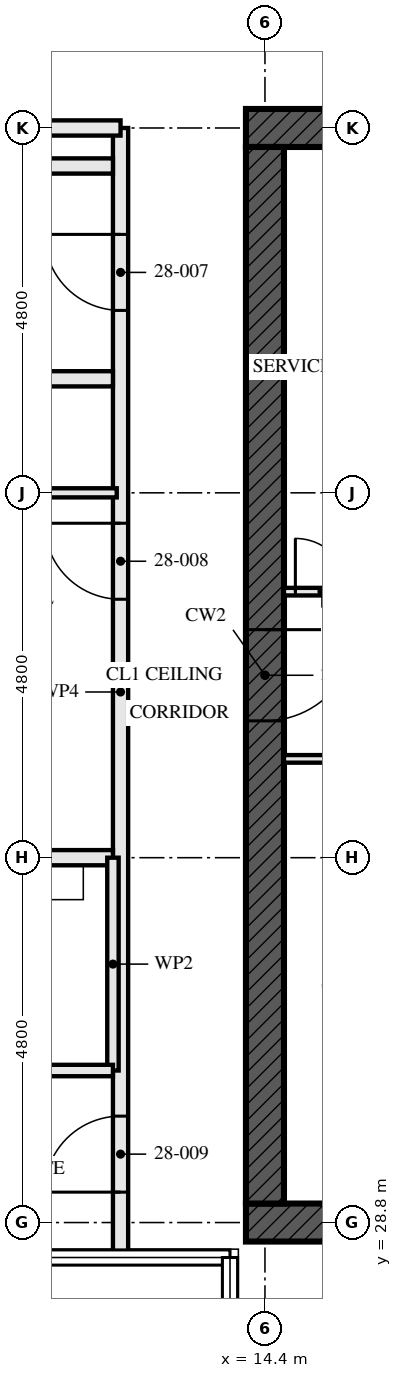
"""IFC4 building model, lengths in metres.
Left out: names, types, materials, properties, quantities, classifications, styles, units other than length and angle.
Written with IfcOpenShell. Run it as: python <this file> out.ifc"""

import sys

from ifc_helpers import new_model, si_unit, direction, frame, frame_2d, origin, place, context, subcontext, project, spatial, rectangle, extrude, element, fill, save


model = new_model("IFC4")
c1 = context("Model", 3, precision=1e-05, world=origin(), true_north=direction((0.0, 1.0)))
c2 = subcontext(c1, "Body", "Model", "MODEL_VIEW")
j1 = project(units=[si_unit("LENGTHUNIT", "METRE"), si_unit("PLANEANGLEUNIT", "RADIAN")], contexts=[c1])
p1 = place(None, origin())
s1 = spatial("IfcSite", under=j1, at=p1, CompositionType="ELEMENT")
p2 = place(p1, origin())
s2 = spatial("IfcBuilding", under=s1, at=p2, CompositionType="ELEMENT")
p3 = place(p2, frame((0.0, 0.0, 105.0)))
s3 = spatial("IfcBuildingStorey", under=s2, at=p3, CompositionType="ELEMENT", Elevation=105.0)
p4 = place(p3, frame((14.15, 28.8, -0.17), z_axis=(0.0, 0.0, 1.0), x_axis=(1.0, 0.0, 0.0)))
e1 = element("IfcWall", 1, at=p4, inside=s3, PredefinedType="SHEAR", context=c2, shape_type="SweptSolid", body=[
    extrude(rectangle(XDim=14.9, YDim=0.5, at=frame_2d((7.45, 0.0))), origin(), (0.0, 0.0, 1.0), 3.5),
])
p5 = place(p4, frame((6.85, 0.0, 0.17)))
e2 = element("IfcOpeningElement", 2, at=p5, cuts=e1, PredefinedType="OPENING", context=c2, shape_type="SweptSolid", body=[
    extrude(rectangle(XDim=1.2, YDim=2.1, at=frame_2d((0.6, 1.05))), frame((0.0, 0.26, 0.0), z_axis=(0.0, -1.0, 0.0), x_axis=(1.0, 0.0, 0.0)), (0.0, 0.0, 1.0), 0.521),
])
p6 = place(p3, frame((29.05, 43.2, -0.17), z_axis=(0.0, 0.0, 1.0), x_axis=(-1.0, 0.0, 0.0)))
e3 = element("IfcWall", 3, at=p6, inside=s3, PredefinedType="SHEAR", context=c2, shape_type="SweptSolid", body=[
    extrude(rectangle(XDim=14.9, YDim=0.5, at=frame_2d((7.45, 0.0))), origin(), (0.0, 0.0, 1.0), 3.5),
])
p7 = place(p6, frame((6.85, 0.0, 0.17)))
e4 = element("IfcOpeningElement", 4, at=p7, cuts=e3, PredefinedType="OPENING", context=c2, shape_type="SweptSolid", body=[
    extrude(rectangle(XDim=1.2, YDim=2.1, at=frame_2d((0.6, 1.05))), frame((0.0, 0.26, 0.0), z_axis=(0.0, -1.0, 0.0), x_axis=(1.0, 0.0, 0.0)), (0.0, 0.0, 1.0), 0.521),
])
p8 = place(p3, frame((14.4, 42.95, -0.17), z_axis=(0.0, 0.0, 1.0), x_axis=(0.0, -1.0, 0.0)))
e5 = element("IfcWall", 5, at=p8, inside=s3, PredefinedType="SHEAR", context=c2, shape_type="SweptSolid", body=[
    extrude(rectangle(XDim=13.9, YDim=0.5, at=frame_2d((6.95, 0.0))), origin(), (0.0, 0.0, 1.0), 3.5),
])
p9 = place(p8, frame((6.35, 0.0, 0.17)))
e6 = element("IfcOpeningElement", 6, at=p9, cuts=e5, PredefinedType="OPENING", context=c2, shape_type="SweptSolid", body=[
    extrude(rectangle(XDim=1.2, YDim=2.1, at=frame_2d((0.6, 1.05))), frame((0.0, 0.26, 0.0), z_axis=(0.0, -1.0, 0.0), x_axis=(1.0, 0.0, 0.0)), (0.0, 0.0, 1.0), 0.521),
])
for number, where, z_axis, x_axis in (
    (7, (7.7, 42.7, 0.0), (0.0, 0.0, 1.0), (1.0, 0.0, 0.0)),
    (8, (7.7, 39.9, 0.0), (0.0, 0.0, 1.0), (1.0, 0.0, 0.0)),
):
    element("IfcWall", number, at=place(p3, frame(where, z_axis=z_axis, x_axis=x_axis)), inside=s3, PredefinedType="SOLIDWALL", context=c2, shape_type="SweptSolid", body=[
        extrude(rectangle(XDim=4.7, YDim=0.2, at=frame_2d((2.35, 0.0))), origin(), (0.0, 0.0, 1.0), 2.99),
    ])
p10 = place(p3, frame((6.4, 38.4, 0.0), z_axis=(0.0, 0.0, 1.0), x_axis=(1.0, 0.0, 0.0)))
e9 = element("IfcWall", 9, at=p10, inside=s3, PredefinedType="PARTITIONING", context=c2, shape_type="SweptSolid", body=[
    extrude(rectangle(XDim=6.05, YDim=0.12, at=frame_2d((3.025, 0.0))), origin(), (0.0, 0.0, 1.0), 2.55),
])
p11 = place(p10, frame((4.05, 0.0, 0.0)))
e10 = element("IfcOpeningElement", 10, at=p11, cuts=e9, PredefinedType="OPENING", context=c2, shape_type="SweptSolid", body=[
    extrude(rectangle(XDim=0.9, YDim=2.1, at=frame_2d((0.45, 1.05))), frame((0.0, 0.071, 0.0), z_axis=(0.0, -1.0, 0.0), x_axis=(1.0, 0.0, 0.0)), (0.0, 0.0, 1.0), 0.141),
])
p12 = place(p3, frame((5.145, 33.6, 0.0), z_axis=(0.0, 0.0, 1.0), x_axis=(1.0, 0.0, 0.0)))
e11 = element("IfcWall", 11, at=p12, inside=s3, PredefinedType="PARTITIONING", context=c2, shape_type="SweptSolid", body=[
    extrude(rectangle(XDim=7.255, YDim=0.2, at=frame_2d((3.627, 0.0))), origin(), (0.0, 0.0, 1.0), 2.55),
])
p13 = place(p3, frame((9.4, 30.8, 0.0), z_axis=(0.0, 0.0, 1.0), x_axis=(1.0, 0.0, 0.0)))
e12 = element("IfcWall", 12, at=p13, inside=s3, PredefinedType="PARTITIONING", context=c2, shape_type="SweptSolid", body=[
    extrude(rectangle(XDim=3.0, YDim=0.15, at=frame_2d((1.5, 0.0))), origin(), (0.0, 0.0, 1.0), 3.33),
])
p14 = place(p3, frame((12.4, 33.6, 0.0), z_axis=(0.0, 0.0, 1.0), x_axis=(0.0, -1.0, 0.0)))
e13 = element("IfcWall", 13, at=p14, inside=s3, PredefinedType="PARTITIONING", context=c2, shape_type="SweptSolid", body=[
    extrude(rectangle(XDim=2.8, YDim=0.15, at=frame_2d((1.4, 0.0))), origin(), (0.0, 0.0, 1.0), 3.33),
])
p15 = place(p3, frame((12.5, 43.2, 0.0), z_axis=(0.0, 0.0, 1.0), x_axis=(0.0, -1.0, 0.0)))
e14 = element("IfcWall", 14, at=p15, inside=s3, PredefinedType="PARTITIONING", context=c2, shape_type="SweptSolid", body=[
    extrude(rectangle(XDim=14.84, YDim=0.2, at=frame_2d((7.42, 0.0))), origin(), (0.0, 0.0, 1.0), 2.32),
])
p16 = place(p15, frame((1.4, 0.0, 0.0)))
e15 = element("IfcOpeningElement", 15, at=p16, cuts=e14, PredefinedType="OPENING", context=c2, shape_type="SweptSolid", body=[
    extrude(rectangle(XDim=1.0, YDim=2.1, at=frame_2d((0.5, 1.05))), frame((0.0, 0.111, 0.0), z_axis=(0.0, -1.0, 0.0), x_axis=(1.0, 0.0, 0.0)), (0.0, 0.0, 1.0), 0.221),
])
p17 = place(p15, frame((5.2, 0.0, 0.0)))
e16 = element("IfcOpeningElement", 16, at=p17, cuts=e14, PredefinedType="OPENING", context=c2, shape_type="SweptSolid", body=[
    extrude(rectangle(XDim=1.0, YDim=2.1, at=frame_2d((0.5, 1.05))), frame((0.0, 0.111, 0.0), z_axis=(0.0, -1.0, 0.0), x_axis=(1.0, 0.0, 0.0)), (0.0, 0.0, 1.0), 0.221),
])
p18 = place(p15, frame((13.0, 0.0, 0.0)))
e17 = element("IfcOpeningElement", 17, at=p18, cuts=e14, PredefinedType="OPENING", context=c2, shape_type="SweptSolid", body=[
    extrude(rectangle(XDim=1.0, YDim=2.1, at=frame_2d((0.5, 1.05))), frame((0.0, 0.111, 0.0), z_axis=(0.0, -1.0, 0.0), x_axis=(1.0, 0.0, 0.0)), (0.0, 0.0, 1.0), 0.221),
])
p19 = place(p3, frame((14.65, 34.9, 0.0), z_axis=(0.0, 0.0, 1.0), x_axis=(1.0, 0.0, 0.0)))
e18 = element("IfcWall", 18, at=p19, inside=s3, PredefinedType="SOLIDWALL", context=c2, shape_type="SweptSolid", body=[
    extrude(rectangle(XDim=5.9, YDim=0.1, at=frame_2d((2.95, 0.0))), origin(), (0.0, 0.0, 1.0), 3.33),
])
p20 = place(p19, frame((1.6, 0.0, 0.0)))
e19 = element("IfcOpeningElement", 19, at=p20, cuts=e18, PredefinedType="OPENING", context=c2, shape_type="SweptSolid", body=[
    extrude(rectangle(XDim=0.7, YDim=2.1, at=frame_2d((0.35, 1.05))), frame((0.0, 0.061, 0.0), z_axis=(0.0, -1.0, 0.0), x_axis=(1.0, 0.0, 0.0)), (0.0, 0.0, 1.0), 0.121),
])
p21 = place(p3, frame((14.65, 37.1, 0.0), z_axis=(0.0, 0.0, 1.0), x_axis=(1.0, 0.0, 0.0)))
e20 = element("IfcWall", 20, at=p21, inside=s3, PredefinedType="SOLIDWALL", context=c2, shape_type="SweptSolid", body=[
    extrude(rectangle(XDim=5.9, YDim=0.1, at=frame_2d((2.95, 0.0))), origin(), (0.0, 0.0, 1.0), 3.33),
])
p22 = place(p21, frame((0.15, 0.0, 0.0)))
e21 = element("IfcOpeningElement", 21, at=p22, cuts=e20, PredefinedType="OPENING", context=c2, shape_type="SweptSolid", body=[
    extrude(rectangle(XDim=0.7, YDim=2.1, at=frame_2d((0.35, 1.05))), frame((0.0, 0.061, 0.0), z_axis=(0.0, -1.0, 0.0), x_axis=(1.0, 0.0, 0.0)), (0.0, 0.0, 1.0), 0.121),
])
p23 = place(p21, frame((1.5, 0.0, 0.0)))
e22 = element("IfcOpeningElement", 22, at=p23, cuts=e20, PredefinedType="OPENING", context=c2, shape_type="SweptSolid", body=[
    extrude(rectangle(XDim=0.9, YDim=2.1, at=frame_2d((0.45, 1.05))), frame((0.0, 0.061, 0.0), z_axis=(0.0, -1.0, 0.0), x_axis=(1.0, 0.0, 0.0)), (0.0, 0.0, 1.0), 0.121),
])
p24 = place(p3, frame((12.5, 43.2, 0.0), z_axis=(0.0, 0.0, 1.0), x_axis=(-1.0, 0.0, 0.0)))
e23 = element("IfcWall", 23, at=p24, inside=s3, PredefinedType="PARTITIONING", context=c2, shape_type="SweptSolid", body=[
    extrude(rectangle(XDim=2.555, YDim=0.2, at=frame_2d((1.277, 0.0))), origin(), (0.0, 0.0, 1.0), 2.32),
])
p25 = place(p16, frame((1.0, 0.0, 0.0), z_axis=(0.0, 0.0, 1.0), x_axis=(-1.0, 0.0, 0.0)))
e24 = element("IfcDoor", 24, at=p25, inside=s3, OperationType="SINGLE_SWING_LEFT", PredefinedType="DOOR", context=c2, shape_type="SweptSolid", body=[
    extrude(rectangle(XDim=1.0, YDim=2.1, at=frame_2d((0.5, 1.05))), frame((0.0, 0.032, 0.0), z_axis=(0.0, -1.0, 0.0), x_axis=(1.0, 0.0, 0.0)), (0.0, 0.0, 1.0), 0.064),
])
fill(e15, e24)
p26 = place(p17, frame((1.0, 0.0, 0.0), z_axis=(0.0, 0.0, 1.0), x_axis=(-1.0, 0.0, 0.0)))
e25 = element("IfcDoor", 25, at=p26, inside=s3, OperationType="SINGLE_SWING_LEFT", PredefinedType="DOOR", context=c2, shape_type="SweptSolid", body=[
    extrude(rectangle(XDim=1.0, YDim=2.1, at=frame_2d((0.5, 1.05))), frame((0.0, 0.027, 0.0), z_axis=(0.0, -1.0, 0.0), x_axis=(1.0, 0.0, 0.0)), (0.0, 0.0, 1.0), 0.054),
])
fill(e16, e25)
p27 = place(p18, frame((1.0, 0.0, 0.0), z_axis=(0.0, 0.0, 1.0), x_axis=(-1.0, 0.0, 0.0)))
e26 = element("IfcDoor", 26, at=p27, inside=s3, OperationType="SINGLE_SWING_RIGHT", PredefinedType="DOOR", context=c2, shape_type="SweptSolid", body=[
    extrude(rectangle(XDim=1.0, YDim=2.1, at=frame_2d((0.5, 1.05))), frame((0.0, 0.027, 0.0), z_axis=(0.0, -1.0, 0.0), x_axis=(1.0, 0.0, 0.0)), (0.0, 0.0, 1.0), 0.054),
])
fill(e17, e26)
p28 = place(p22, origin())
e27 = element("IfcDoor", 27, at=p28, inside=s3, OperationType="SINGLE_SWING_RIGHT", PredefinedType="DOOR", context=c2, shape_type="SweptSolid", body=[
    extrude(rectangle(XDim=0.7, YDim=2.1, at=frame_2d((0.35, 1.05))), frame((0.0, 0.027, 0.0), z_axis=(0.0, -1.0, 0.0), x_axis=(1.0, 0.0, 0.0)), (0.0, 0.0, 1.0), 0.054),
])
fill(e21, e27)
p29 = place(p9, origin())
e28 = element("IfcDoor", 28, at=p29, inside=s3, OperationType="SINGLE_SWING_LEFT", PredefinedType="DOOR", context=c2, shape_type="SweptSolid", body=[
    extrude(rectangle(XDim=1.2, YDim=2.1, at=frame_2d((0.6, 1.05))), frame((0.0, 0.027, 0.0), z_axis=(0.0, -1.0, 0.0), x_axis=(1.0, 0.0, 0.0)), (0.0, 0.0, 1.0), 0.054),
])
fill(e6, e28)
save(model, sys.argv[1])
